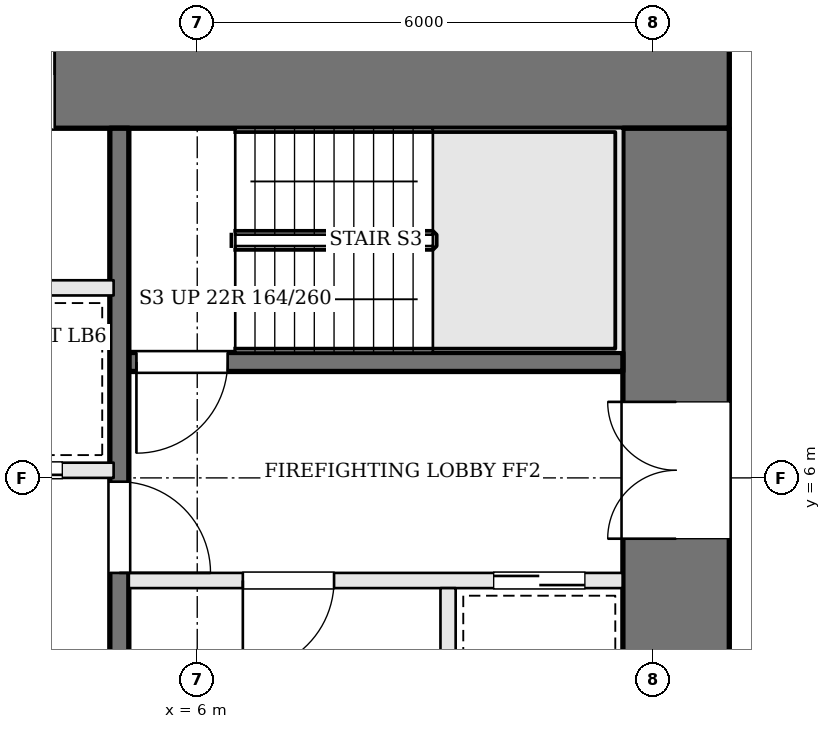
"""IFC4 building model, lengths in metres.
Left out: names, types, materials, properties, quantities, classifications, styles, units other than length and angle.
Written with IfcOpenShell. Run it as: python <this file> out.ifc"""

import sys

from ifc_helpers import new_model, si_unit, direction, frame, frame_2d, origin, place, context, subcontext, project, spatial, rectangle, extrude, element, fill, save


model = new_model("IFC4")
c1 = context("Model", 3, precision=1e-05, world=origin(), true_north=direction((0.0, 1.0)))
c2 = subcontext(c1, "Body", "Model", "MODEL_VIEW")
j1 = project(units=[si_unit("LENGTHUNIT", "METRE"), si_unit("PLANEANGLEUNIT", "RADIAN")], contexts=[c1])
p1 = place(None, origin())
s1 = spatial("IfcSite", under=j1, at=p1, CompositionType="ELEMENT")
p2 = place(p1, origin())
s2 = spatial("IfcBuilding", under=s1, at=p2, CompositionType="ELEMENT")
p3 = place(p2, frame((0.0, 0.0, 73.5)))
s3 = spatial("IfcBuildingStorey", under=s2, at=p3, CompositionType="ELEMENT", Elevation=73.5)
p4 = place(p3, frame((-13.0, 11.3, 0.0), z_axis=(0.0, 0.0, 1.0), x_axis=(1.0, 0.0, 0.0)))
e1 = element("IfcWall", 1, at=p4, inside=s3, PredefinedType="SHEAR", context=c2, shape_type="SweptSolid", body=[
    extrude(rectangle(XDim=26.0, YDim=1.4, at=frame_2d((13.0, 0.0))), origin(), (0.0, 0.0, 1.0), 3.6),
])
p5 = place(p4, frame((9.225, 0.0, 0.0)))
e2 = element("IfcOpeningElement", 2, at=p5, cuts=e1, PredefinedType="OPENING", context=c2, shape_type="SweptSolid", body=[
    extrude(rectangle(XDim=1.0, YDim=2.1, at=frame_2d((0.5, 1.05))), frame((0.0, 0.71, 0.0), z_axis=(0.0, -1.0, 0.0), x_axis=(1.0, 0.0, 0.0)), (0.0, 0.0, 1.0), 1.42),
])
p6 = place(p4, frame((11.825, 0.0, 0.0)))
e3 = element("IfcOpeningElement", 3, at=p6, cuts=e1, PredefinedType="OPENING", context=c2, shape_type="SweptSolid", body=[
    extrude(rectangle(XDim=0.7, YDim=2.1, at=frame_2d((0.35, 1.05))), frame((0.0, 0.71, 0.0), z_axis=(0.0, -1.0, 0.0), x_axis=(1.0, 0.0, 0.0)), (0.0, 0.0, 1.0), 1.42),
])
p7 = place(p4, frame((13.725, 0.0, 0.0)))
e4 = element("IfcOpeningElement", 4, at=p7, cuts=e1, PredefinedType="OPENING", context=c2, shape_type="SweptSolid", body=[
    extrude(rectangle(XDim=1.0, YDim=2.1, at=frame_2d((0.5, 1.05))), frame((0.0, 0.71, 0.0), z_axis=(0.0, -1.0, 0.0), x_axis=(1.0, 0.0, 0.0)), (0.0, 0.0, 1.0), 1.42),
])
p8 = place(p4, frame((16.225, 0.0, 0.0)))
e5 = element("IfcOpeningElement", 5, at=p8, cuts=e1, PredefinedType="OPENING", context=c2, shape_type="SweptSolid", body=[
    extrude(rectangle(XDim=0.9, YDim=2.1, at=frame_2d((0.45, 1.05))), frame((0.0, 0.71, 0.0), z_axis=(0.0, -1.0, 0.0), x_axis=(1.0, 0.0, 0.0)), (0.0, 0.0, 1.0), 1.42),
])
p9 = place(p3, frame((12.3, -1.6, 0.0), z_axis=(0.0, 0.0, 1.0), x_axis=(0.0, 1.0, 0.0)))
e6 = element("IfcWall", 6, at=p9, inside=s3, PredefinedType="SHEAR", context=c2, shape_type="SweptSolid", body=[
    extrude(rectangle(XDim=12.2, YDim=1.4, at=frame_2d((6.1, 0.0))), origin(), (0.0, 0.0, 1.0), 3.6),
])
p10 = place(p9, frame((6.8, 0.0, 0.0)))
e7 = element("IfcOpeningElement", 7, at=p10, cuts=e6, PredefinedType="OPENING", context=c2, shape_type="SweptSolid", body=[
    extrude(rectangle(XDim=1.8, YDim=2.1, at=frame_2d((0.9, 1.05))), frame((0.0, 0.71, 0.0), z_axis=(0.0, -1.0, 0.0), x_axis=(1.0, 0.0, 0.0)), (0.0, 0.0, 1.0), 1.42),
])
p11 = place(p3, frame((11.6, 7.525, 0.0), z_axis=(0.0, 0.0, 1.0), x_axis=(-1.0, 0.0, 0.0)))
e8 = element("IfcWall", 8, at=p11, inside=s3, PredefinedType="SOLIDWALL", context=c2, shape_type="SweptSolid", body=[
    extrude(rectangle(XDim=6.5, YDim=0.25, at=frame_2d((3.25, 0.0))), origin(), (0.0, 0.0, 1.0), 3.3),
])
p12 = place(p11, frame((5.2, 0.0, 0.0)))
e9 = element("IfcOpeningElement", 9, at=p12, cuts=e8, PredefinedType="OPENING", context=c2, shape_type="SweptSolid", body=[
    extrude(rectangle(XDim=1.2, YDim=2.1, at=frame_2d((0.6, 1.05))), frame((0.0, 0.135, 0.0), z_axis=(0.0, -1.0, 0.0), x_axis=(1.0, 0.0, 0.0)), (0.0, 0.0, 1.0), 0.27),
])
p13 = place(p3, frame((11.6, 4.65, 0.0), z_axis=(0.0, 0.0, 1.0), x_axis=(-1.0, 0.0, 0.0)))
e10 = element("IfcWall", 10, at=p13, inside=s3, PredefinedType="SOLIDWALL", context=c2, shape_type="SweptSolid", body=[
    extrude(rectangle(XDim=6.5, YDim=0.2, at=frame_2d((3.25, 0.0))), origin(), (0.0, 0.0, 1.0), 3.3),
])
p14 = place(p13, frame((3.8, 0.0, 0.0)))
e11 = element("IfcOpeningElement", 11, at=p14, cuts=e10, PredefinedType="OPENING", context=c2, shape_type="SweptSolid", body=[
    extrude(rectangle(XDim=1.2, YDim=2.1, at=frame_2d((0.6, 1.05))), frame((0.0, 0.11, 0.0), z_axis=(0.0, -1.0, 0.0), x_axis=(1.0, 0.0, 0.0)), (0.0, 0.0, 1.0), 0.22),
])
p15 = place(p13, frame((0.5, 0.0, 0.0)))
e12 = element("IfcOpeningElement", 12, at=p15, cuts=e10, PredefinedType="OPENING", context=c2, shape_type="SweptSolid", body=[
    extrude(rectangle(XDim=1.2, YDim=2.1, at=frame_2d((0.6, 1.05))), frame((0.0, 0.11, 0.0), z_axis=(0.0, -1.0, 0.0), x_axis=(1.0, 0.0, 0.0)), (0.0, 0.0, 1.0), 0.22),
])
p16 = place(p3, frame((9.3, 4.55, 0.0), z_axis=(0.0, 0.0, 1.0), x_axis=(0.0, -1.0, 0.0)))
e13 = element("IfcWall", 13, at=p16, inside=s3, PredefinedType="SOLIDWALL", context=c2, shape_type="SweptSolid", body=[
    extrude(rectangle(XDim=3.0, YDim=0.2, at=frame_2d((1.5, 0.0))), origin(), (0.0, 0.0, 1.0), 3.3),
])
p17 = place(p3, frame((4.975, 10.6, 0.0), z_axis=(0.0, 0.0, 1.0), x_axis=(0.0, -1.0, 0.0)))
e14 = element("IfcWall", 14, at=p17, inside=s3, PredefinedType="SOLIDWALL", context=c2, shape_type="SweptSolid", body=[
    extrude(rectangle(XDim=12.2, YDim=0.25, at=frame_2d((6.1, 0.0))), origin(), (0.0, 0.0, 1.0), 3.3),
])
p18 = place(p17, frame((4.65, 0.0, 0.0)))
e15 = element("IfcOpeningElement", 15, at=p18, cuts=e14, PredefinedType="OPENING", context=c2, shape_type="SweptSolid", body=[
    extrude(rectangle(XDim=1.2, YDim=2.1, at=frame_2d((0.6, 1.05))), frame((0.0, 0.135, 0.0), z_axis=(0.0, -1.0, 0.0), x_axis=(1.0, 0.0, 0.0)), (0.0, 0.0, 1.0), 0.27),
])
p19 = place(p3, frame((-4.9, 6.1, 0.0), z_axis=(0.0, 0.0, 1.0), x_axis=(1.0, 0.0, 0.0)))
e16 = element("IfcWall", 16, at=p19, inside=s3, PredefinedType="SOLIDWALL", context=c2, shape_type="SweptSolid", body=[
    extrude(rectangle(XDim=9.8, YDim=0.2, at=frame_2d((4.9, 0.0))), origin(), (0.0, 0.0, 1.0), 3.3),
])
p20 = place(p19, frame((0.675, 0.0, 0.0)))
e17 = element("IfcOpeningElement", 17, at=p20, cuts=e16, PredefinedType="OPENING", context=c2, shape_type="SweptSolid", body=[
    extrude(rectangle(XDim=1.1, YDim=2.1, at=frame_2d((0.55, 1.05))), frame((0.0, 0.11, 0.0), z_axis=(0.0, -1.0, 0.0), x_axis=(1.0, 0.0, 0.0)), (0.0, 0.0, 1.0), 0.22),
])
p21 = place(p19, frame((3.125, 0.0, 0.0)))
e18 = element("IfcOpeningElement", 18, at=p21, cuts=e16, PredefinedType="OPENING", context=c2, shape_type="SweptSolid", body=[
    extrude(rectangle(XDim=1.1, YDim=2.1, at=frame_2d((0.55, 1.05))), frame((0.0, 0.11, 0.0), z_axis=(0.0, -1.0, 0.0), x_axis=(1.0, 0.0, 0.0)), (0.0, 0.0, 1.0), 0.22),
])
p22 = place(p19, frame((5.575, 0.0, 0.0)))
e19 = element("IfcOpeningElement", 19, at=p22, cuts=e16, PredefinedType="OPENING", context=c2, shape_type="SweptSolid", body=[
    extrude(rectangle(XDim=1.1, YDim=2.1, at=frame_2d((0.55, 1.05))), frame((0.0, 0.11, 0.0), z_axis=(0.0, -1.0, 0.0), x_axis=(1.0, 0.0, 0.0)), (0.0, 0.0, 1.0), 0.22),
])
p23 = place(p19, frame((8.025, 0.0, 0.0)))
e20 = element("IfcOpeningElement", 20, at=p23, cuts=e16, PredefinedType="OPENING", context=c2, shape_type="SweptSolid", body=[
    extrude(rectangle(XDim=1.1, YDim=2.1, at=frame_2d((0.55, 1.05))), frame((0.0, 0.11, 0.0), z_axis=(0.0, -1.0, 0.0), x_axis=(1.0, 0.0, 0.0)), (0.0, 0.0, 1.0), 0.22),
])
p24 = place(p3, frame((-4.9, 8.5, 0.0), z_axis=(0.0, 0.0, 1.0), x_axis=(1.0, 0.0, 0.0)))
e21 = element("IfcWall", 21, at=p24, inside=s3, PredefinedType="SOLIDWALL", context=c2, shape_type="SweptSolid", body=[
    extrude(rectangle(XDim=9.8, YDim=0.2, at=frame_2d((4.9, 0.0))), origin(), (0.0, 0.0, 1.0), 3.3),
])
p25 = place(p10, origin())
e22 = element("IfcDoor", 22, at=p25, inside=s3, OperationType="DOUBLE_DOOR_SINGLE_SWING", PredefinedType="DOOR", context=c2, shape_type="SweptSolid", body=[
    extrude(rectangle(XDim=1.8, YDim=2.1, at=frame_2d((0.9, 1.05))), frame((0.0, 0.025, 0.0), z_axis=(0.0, -1.0, 0.0), x_axis=(1.0, 0.0, 0.0)), (0.0, 0.0, 1.0), 0.05),
])
fill(e7, e22)
p26 = place(p18, origin())
e23 = element("IfcDoor", 23, at=p26, inside=s3, OperationType="SINGLE_SWING_RIGHT", PredefinedType="DOOR", context=c2, shape_type="SweptSolid", body=[
    extrude(rectangle(XDim=1.2, YDim=2.1, at=frame_2d((0.6, 1.05))), frame((0.0, 0.025, 0.0), z_axis=(0.0, -1.0, 0.0), x_axis=(1.0, 0.0, 0.0)), (0.0, 0.0, 1.0), 0.05),
])
fill(e15, e23)
p27 = place(p14, origin())
e24 = element("IfcDoor", 24, at=p27, inside=s3, OperationType="SINGLE_SWING_RIGHT", PredefinedType="DOOR", context=c2, shape_type="SweptSolid", body=[
    extrude(rectangle(XDim=1.2, YDim=2.1, at=frame_2d((0.6, 1.05))), frame((0.0, 0.025, 0.0), z_axis=(0.0, -1.0, 0.0), x_axis=(1.0, 0.0, 0.0)), (0.0, 0.0, 1.0), 0.05),
])
fill(e11, e24)
p28 = place(p12, origin())
e25 = element("IfcDoor", 25, at=p28, inside=s3, OperationType="SINGLE_SWING_RIGHT", PredefinedType="DOOR", context=c2, shape_type="SweptSolid", body=[
    extrude(rectangle(XDim=1.2, YDim=2.1, at=frame_2d((0.6, 1.05))), frame((0.0, 0.025, 0.0), z_axis=(0.0, -1.0, 0.0), x_axis=(1.0, 0.0, 0.0)), (0.0, 0.0, 1.0), 0.05),
])
fill(e9, e25)
p29 = place(p15, origin())
e26 = element("IfcDoor", 26, at=p29, inside=s3, OperationType="SLIDING_TO_RIGHT", PredefinedType="DOOR", context=c2, shape_type="SweptSolid", body=[
    extrude(rectangle(XDim=1.2, YDim=2.1, at=frame_2d((0.6, 1.05))), frame((0.0, 0.025, 0.0), z_axis=(0.0, -1.0, 0.0), x_axis=(1.0, 0.0, 0.0)), (0.0, 0.0, 1.0), 0.05),
])
fill(e12, e26)
p30 = place(p23, origin())
e27 = element("IfcDoor", 27, at=p30, inside=s3, OperationType="SLIDING_TO_LEFT", PredefinedType="DOOR", context=c2, shape_type="SweptSolid", body=[
    extrude(rectangle(XDim=1.1, YDim=2.1, at=frame_2d((0.55, 1.05))), frame((0.0, 0.025, 0.0), z_axis=(0.0, -1.0, 0.0), x_axis=(1.0, 0.0, 0.0)), (0.0, 0.0, 1.0), 0.05),
])
fill(e20, e27)
p31 = place(p8, origin())
e28 = element("IfcDoor", 28, at=p31, inside=s3, OperationType="SINGLE_SWING_RIGHT", PredefinedType="DOOR", context=c2, shape_type="SweptSolid", body=[
    extrude(rectangle(XDim=0.9, YDim=2.1, at=frame_2d((0.45, 1.05))), frame((0.0, 0.025, 0.0), z_axis=(0.0, -1.0, 0.0), x_axis=(1.0, 0.0, 0.0)), (0.0, 0.0, 1.0), 0.05),
])
fill(e5, e28)
save(model, sys.argv[1])
